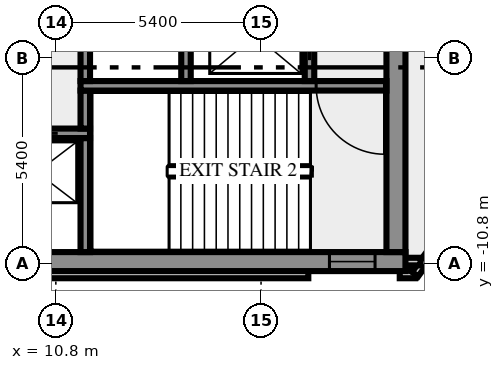
"""IFC4 building model, lengths in metres.
Left out: names, types, materials, properties, quantities, classifications, styles, units other than length and angle.
Written with IfcOpenShell. Run it as: python <this file> out.ifc"""

import sys

from ifc_helpers import new_model, si_unit, direction, frame, frame_2d, origin, place, context, subcontext, project, spatial, rectangle, extrude, element, fill, save


model = new_model("IFC4")
c1 = context("Model", 3, precision=1e-05, world=origin(), true_north=direction((0.0, 1.0)))
c2 = subcontext(c1, "Body", "Model", "MODEL_VIEW")
j1 = project(units=[si_unit("LENGTHUNIT", "METRE"), si_unit("PLANEANGLEUNIT", "RADIAN")], contexts=[c1])
p1 = place(None, origin())
s1 = spatial("IfcSite", under=j1, at=p1, CompositionType="ELEMENT")
p2 = place(p1, origin())
s2 = spatial("IfcBuilding", under=s1, at=p2, CompositionType="ELEMENT")
p3 = place(p2, frame((0.0, 0.0, 222.0)))
s3 = spatial("IfcBuildingStorey", under=s2, at=p3, CompositionType="ELEMENT", Elevation=222.0)
p4 = place(p3, frame((-17.444, -11.088, 0.0), z_axis=(0.0, 0.0, 1.0), x_axis=(1.0, 0.0, 0.0)))
e1 = element("IfcWall", 1, at=p4, inside=s3, PredefinedType="SOLIDWALL", context=c2, shape_type="SweptSolid", body=[
    extrude(rectangle(XDim=34.888, YDim=0.2, at=frame_2d((17.444, 0.0))), origin(), (0.0, 0.0, 1.0), 3.65),
])
p5 = place(p3, frame((19.85, -11.088, 0.0), z_axis=(0.0, 0.0, 1.0), x_axis=(1.0, 0.0, 0.0)))
e2 = element("IfcWall", 2, at=p5, inside=s3, PredefinedType="SOLIDWALL", context=c2, shape_type="SweptSolid", body=[
    extrude(rectangle(XDim=0.406, YDim=0.2, at=frame_2d((0.203, 0.0))), origin(), (0.0, 0.0, 1.0), 3.65),
])
p6 = place(p3, frame((20.253, -11.083, 0.0), z_axis=(0.0, 0.0, 1.0), x_axis=(0.587766567315, 0.809030569476, 0.0)))
e3 = element("IfcWall", 3, at=p6, inside=s3, PredefinedType="SOLIDWALL", context=c2, shape_type="SweptSolid", body=[
    extrude(rectangle(XDim=2.688, YDim=0.2, at=frame_2d((1.344, 0.0))), origin(), (0.0, 0.0, 1.0), 3.65),
])
p7 = place(p3, frame((19.98, -10.75, 0.0), z_axis=(0.0, 0.0, 1.0), x_axis=(1.0, 0.0, 0.0)))
e4 = element("IfcWall", 4, at=p7, inside=s3, PredefinedType="SOLIDWALL", context=c2, shape_type="SweptSolid", body=[
    extrude(rectangle(XDim=0.417, YDim=0.2, at=frame_2d((0.208, 0.0))), origin(), (0.0, 0.0, 1.0), 3.65),
])
p8 = place(p3, frame((-20.0, -10.75, 0.0), z_axis=(0.0, 0.0, 1.0), x_axis=(1.0, 0.0, 0.0)))
e5 = element("IfcWall", 5, at=p8, inside=s3, PredefinedType="SHEAR", context=c2, shape_type="SweptSolid", body=[
    extrude(rectangle(XDim=40.0, YDim=0.5, at=frame_2d((20.0, 0.0))), origin(), (0.0, 0.0, 1.0), 3.65),
])
p9 = place(p8, frame((0.8, 0.0, 1.0)))
e6 = element("IfcOpeningElement", 6, at=p9, cuts=e5, PredefinedType="OPENING", context=c2, shape_type="SweptSolid", body=[
    extrude(rectangle(XDim=1.2, YDim=1.2, at=frame_2d((0.6, 0.6))), frame((0.0, 0.26, 0.0), z_axis=(0.0, -1.0, 0.0), x_axis=(1.0, 0.0, 0.0)), (0.0, 0.0, 1.0), 0.52),
])
p10 = place(p8, frame((38.0, 0.0, 1.0)))
e7 = element("IfcOpeningElement", 7, at=p10, cuts=e5, PredefinedType="OPENING", context=c2, shape_type="SweptSolid", body=[
    extrude(rectangle(XDim=1.2, YDim=1.2, at=frame_2d((0.6, 0.6))), frame((0.0, 0.26, 0.0), z_axis=(0.0, -1.0, 0.0), x_axis=(1.0, 0.0, 0.0)), (0.0, 0.0, 1.0), 0.52),
])
p11 = place(p3, frame((11.575, -10.5, 0.0), z_axis=(0.0, 0.0, 1.0), x_axis=(0.0, 1.0, 0.0)))
e8 = element("IfcWall", 8, at=p11, inside=s3, PredefinedType="SHEAR", context=c2, shape_type="SweptSolid", body=[
    extrude(rectangle(XDim=3.0, YDim=0.25, at=frame_2d((1.5, 0.0))), origin(), (0.0, 0.0, 1.0), 3.65),
])
p12 = place(p3, frame((19.75, -10.5, 0.0), z_axis=(0.0, 0.0, 1.0), x_axis=(0.0, 1.0, 0.0)))
e9 = element("IfcWall", 9, at=p12, inside=s3, PredefinedType="SHEAR", context=c2, shape_type="SweptSolid", body=[
    extrude(rectangle(XDim=8.8, YDim=0.5, at=frame_2d((4.4, 0.0))), origin(), (0.0, 0.0, 1.0), 3.65),
])
p13 = place(p3, frame((11.7, -7.375, 0.0), z_axis=(0.0, 0.0, 1.0), x_axis=(-1.0, 0.0, 0.0)))
e10 = element("IfcWall", 10, at=p13, inside=s3, PredefinedType="SHEAR", context=c2, shape_type="SweptSolid", body=[
    extrude(rectangle(XDim=23.4, YDim=0.25, at=frame_2d((11.7, 0.0))), origin(), (0.0, 0.0, 1.0), 3.65),
])
p14 = place(p13, frame((21.912, 0.0, 0.0)))
e11 = element("IfcOpeningElement", 11, at=p14, cuts=e10, PredefinedType="OPENING", context=c2, shape_type="SweptSolid", body=[
    extrude(rectangle(XDim=0.9, YDim=2.1, at=frame_2d((0.45, 1.05))), frame((0.0, 0.135, 0.0), z_axis=(0.0, -1.0, 0.0), x_axis=(1.0, 0.0, 0.0)), (0.0, 0.0, 1.0), 0.27),
])
p15 = place(p13, frame((19.55, 0.0, 0.0)))
e12 = element("IfcOpeningElement", 12, at=p15, cuts=e10, PredefinedType="OPENING", context=c2, shape_type="SweptSolid", body=[
    extrude(rectangle(XDim=0.9, YDim=2.1, at=frame_2d((0.45, 1.05))), frame((0.0, 0.135, 0.0), z_axis=(0.0, -1.0, 0.0), x_axis=(1.0, 0.0, 0.0)), (0.0, 0.0, 1.0), 0.27),
])
p16 = place(p13, frame((16.688, 0.0, 0.0)))
e13 = element("IfcOpeningElement", 13, at=p16, cuts=e10, PredefinedType="OPENING", context=c2, shape_type="SweptSolid", body=[
    extrude(rectangle(XDim=0.9, YDim=2.1, at=frame_2d((0.45, 1.05))), frame((0.0, 0.135, 0.0), z_axis=(0.0, -1.0, 0.0), x_axis=(1.0, 0.0, 0.0)), (0.0, 0.0, 1.0), 0.27),
])
p17 = place(p13, frame((14.4, 0.0, 0.0)))
e14 = element("IfcOpeningElement", 14, at=p17, cuts=e10, PredefinedType="OPENING", context=c2, shape_type="SweptSolid", body=[
    extrude(rectangle(XDim=0.9, YDim=2.1, at=frame_2d((0.45, 1.05))), frame((0.0, 0.135, 0.0), z_axis=(0.0, -1.0, 0.0), x_axis=(1.0, 0.0, 0.0)), (0.0, 0.0, 1.0), 0.27),
])
p18 = place(p13, frame((12.5, 0.0, 0.0)))
e15 = element("IfcOpeningElement", 15, at=p18, cuts=e10, PredefinedType="OPENING", context=c2, shape_type="SweptSolid", body=[
    extrude(rectangle(XDim=0.9, YDim=2.1, at=frame_2d((0.45, 1.05))), frame((0.0, 0.135, 0.0), z_axis=(0.0, -1.0, 0.0), x_axis=(1.0, 0.0, 0.0)), (0.0, 0.0, 1.0), 0.27),
])
p19 = place(p13, frame((10.6, 0.0, 0.0)))
e16 = element("IfcOpeningElement", 16, at=p19, cuts=e10, PredefinedType="OPENING", context=c2, shape_type="SweptSolid", body=[
    extrude(rectangle(XDim=0.9, YDim=2.1, at=frame_2d((0.45, 1.05))), frame((0.0, 0.135, 0.0), z_axis=(0.0, -1.0, 0.0), x_axis=(1.0, 0.0, 0.0)), (0.0, 0.0, 1.0), 0.27),
])
p20 = place(p13, frame((8.35, 0.0, 0.0)))
e17 = element("IfcOpeningElement", 17, at=p20, cuts=e10, PredefinedType="OPENING", context=c2, shape_type="SweptSolid", body=[
    extrude(rectangle(XDim=1.1, YDim=2.1, at=frame_2d((0.55, 1.05))), frame((0.0, 0.135, 0.0), z_axis=(0.0, -1.0, 0.0), x_axis=(1.0, 0.0, 0.0)), (0.0, 0.0, 1.0), 0.27),
])
p21 = place(p13, frame((5.85, 0.0, 0.0)))
e18 = element("IfcOpeningElement", 18, at=p21, cuts=e10, PredefinedType="OPENING", context=c2, shape_type="SweptSolid", body=[
    extrude(rectangle(XDim=1.1, YDim=2.1, at=frame_2d((0.55, 1.05))), frame((0.0, 0.135, 0.0), z_axis=(0.0, -1.0, 0.0), x_axis=(1.0, 0.0, 0.0)), (0.0, 0.0, 1.0), 0.27),
])
p22 = place(p13, frame((3.35, 0.0, 0.0)))
e19 = element("IfcOpeningElement", 19, at=p22, cuts=e10, PredefinedType="OPENING", context=c2, shape_type="SweptSolid", body=[
    extrude(rectangle(XDim=1.1, YDim=2.1, at=frame_2d((0.55, 1.05))), frame((0.0, 0.135, 0.0), z_axis=(0.0, -1.0, 0.0), x_axis=(1.0, 0.0, 0.0)), (0.0, 0.0, 1.0), 0.27),
])
p23 = place(p13, frame((0.85, 0.0, 0.0)))
e20 = element("IfcOpeningElement", 20, at=p23, cuts=e10, PredefinedType="OPENING", context=c2, shape_type="SweptSolid", body=[
    extrude(rectangle(XDim=1.1, YDim=2.1, at=frame_2d((0.55, 1.05))), frame((0.0, 0.135, 0.0), z_axis=(0.0, -1.0, 0.0), x_axis=(1.0, 0.0, 0.0)), (0.0, 0.0, 1.0), 0.27),
])
p24 = place(p3, frame((11.575, -7.25, 0.0), z_axis=(0.0, 0.0, 1.0), x_axis=(0.0, 1.0, 0.0)))
e21 = element("IfcWall", 21, at=p24, inside=s3, PredefinedType="SHEAR", context=c2, shape_type="SweptSolid", body=[
    extrude(rectangle(XDim=1.0, YDim=0.25, at=frame_2d((0.5, 0.0))), origin(), (0.0, 0.0, 1.0), 3.65),
])
p25 = place(p3, frame((19.5, -6.125, 0.0), z_axis=(0.0, 0.0, 1.0), x_axis=(-1.0, 0.0, 0.0)))
e22 = element("IfcWall", 22, at=p25, inside=s3, PredefinedType="SHEAR", context=c2, shape_type="SweptSolid", body=[
    extrude(rectangle(XDim=8.05, YDim=0.25, at=frame_2d((4.025, 0.0))), origin(), (0.0, 0.0, 1.0), 3.65),
])
p26 = place(p25, frame((0.05, 0.0, 0.0)))
e23 = element("IfcOpeningElement", 23, at=p26, cuts=e22, PredefinedType="OPENING", context=c2, shape_type="SweptSolid", body=[
    extrude(rectangle(XDim=1.8, YDim=2.1, at=frame_2d((0.9, 1.05))), frame((0.0, 0.135, 0.0), z_axis=(0.0, -1.0, 0.0), x_axis=(1.0, 0.0, 0.0)), (0.0, 0.0, 1.0), 0.27),
])
p27 = place(p3, frame((11.575, -6.0, 0.0), z_axis=(0.0, 0.0, 1.0), x_axis=(0.0, 1.0, 0.0)))
e24 = element("IfcWall", 24, at=p27, inside=s3, PredefinedType="SHEAR", context=c2, shape_type="SweptSolid", body=[
    extrude(rectangle(XDim=1.75, YDim=0.25, at=frame_2d((0.875, 0.0))), origin(), (0.0, 0.0, 1.0), 3.65),
])
p28 = place(p3, frame((14.225, -6.0, 0.0), z_axis=(0.0, 0.0, 1.0), x_axis=(0.0, 1.0, 0.0)))
e25 = element("IfcWall", 25, at=p28, inside=s3, PredefinedType="SHEAR", context=c2, shape_type="SweptSolid", body=[
    extrude(rectangle(XDim=4.3, YDim=0.25, at=frame_2d((2.15, 0.0))), origin(), (0.0, 0.0, 1.0), 3.65),
])
p29 = place(p3, frame((17.475, -6.0, 0.0), z_axis=(0.0, 0.0, 1.0), x_axis=(0.0, 1.0, 0.0)))
e26 = element("IfcWall", 26, at=p29, inside=s3, PredefinedType="SHEAR", context=c2, shape_type="SweptSolid", body=[
    extrude(rectangle(XDim=4.3, YDim=0.25, at=frame_2d((2.15, 0.0))), origin(), (0.0, 0.0, 1.0), 3.65),
])
p30 = place(p29, frame((0.55, 0.0, 0.0)))
e27 = element("IfcOpeningElement", 27, at=p30, cuts=e26, PredefinedType="OPENING", context=c2, shape_type="SweptSolid", body=[
    extrude(rectangle(XDim=1.3, YDim=2.1, at=frame_2d((0.65, 1.05))), frame((0.0, 0.135, 0.0), z_axis=(0.0, -1.0, 0.0), x_axis=(1.0, 0.0, 0.0)), (0.0, 0.0, 1.0), 0.27),
])
p31 = place(p10, origin())
e28 = element("IfcWindow", 28, at=p31, inside=s3, PartitioningType="SINGLE_PANEL", PredefinedType="WINDOW", context=c2, shape_type="SweptSolid", body=[
    extrude(rectangle(XDim=1.2, YDim=1.2, at=frame_2d((0.6, 0.6))), frame((0.0, 0.03, 0.0), z_axis=(0.0, -1.0, 0.0), x_axis=(1.0, 0.0, 0.0)), (0.0, 0.0, 1.0), 0.06),
])
fill(e7, e28)
p32 = place(p23, origin())
e29 = element("IfcDoor", 29, at=p32, inside=s3, OperationType="DOUBLE_DOOR_SLIDING", PredefinedType="DOOR", context=c2, shape_type="SweptSolid", body=[
    extrude(rectangle(XDim=1.1, YDim=2.1, at=frame_2d((0.55, 1.05))), frame((0.0, 0.025, 0.0), z_axis=(0.0, -1.0, 0.0), x_axis=(1.0, 0.0, 0.0)), (0.0, 0.0, 1.0), 0.05),
])
fill(e20, e29)
p33 = place(p26, origin())
e30 = element("IfcDoor", 30, at=p33, inside=s3, OperationType="DOUBLE_DOOR_SINGLE_SWING", PredefinedType="DOOR", context=c2, shape_type="SweptSolid", body=[
    extrude(rectangle(XDim=1.8, YDim=2.1, at=frame_2d((0.9, 1.05))), frame((0.0, 0.025, 0.0), z_axis=(0.0, -1.0, 0.0), x_axis=(1.0, 0.0, 0.0)), (0.0, 0.0, 1.0), 0.05),
])
fill(e23, e30)
p34 = place(p30, origin())
e31 = element("IfcDoor", 31, at=p34, inside=s3, OperationType="DOUBLE_DOOR_SLIDING", PredefinedType="DOOR", context=c2, shape_type="SweptSolid", body=[
    extrude(rectangle(XDim=1.3, YDim=2.1, at=frame_2d((0.65, 1.05))), frame((0.0, 0.025, 0.0), z_axis=(0.0, -1.0, 0.0), x_axis=(1.0, 0.0, 0.0)), (0.0, 0.0, 1.0), 0.05),
])
fill(e27, e31)
save(model, sys.argv[1])
